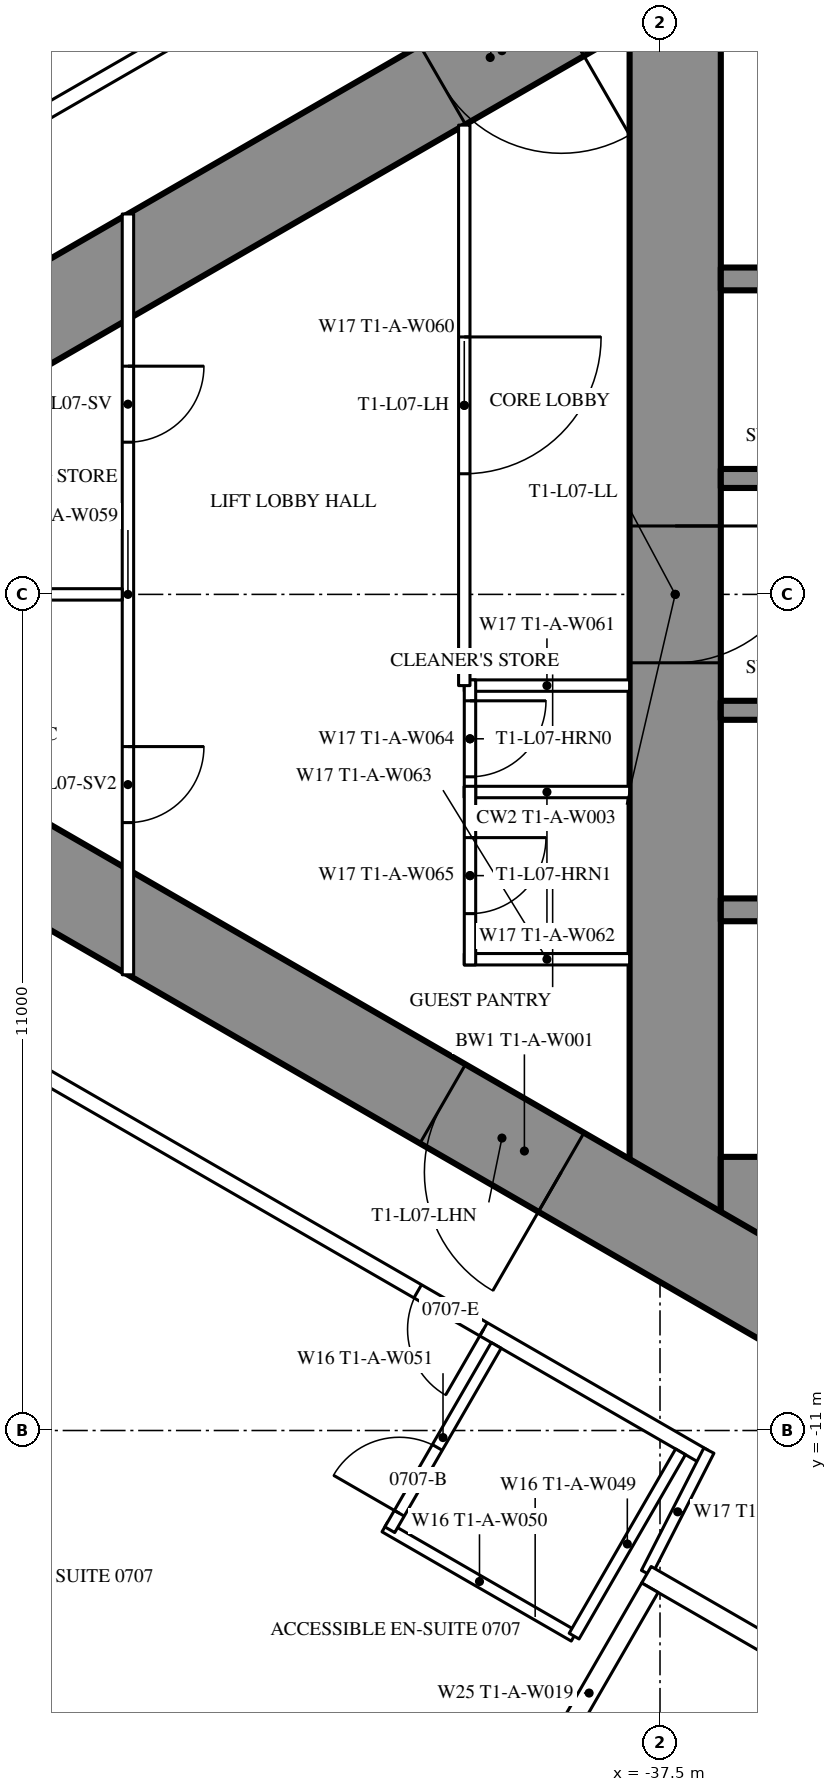
"""IFC4 building model, lengths in metres.
Left out: names, types, materials, properties, quantities, classifications, styles, units other than length and angle.
Written with IfcOpenShell. Run it as: python <this file> out.ifc"""

import sys

from ifc_helpers import new_model, si_unit, direction, frame, frame_2d, origin, place, context, subcontext, project, spatial, rectangle, extrude, element, fill, save


model = new_model("IFC4")
c1 = context("Model", 3, precision=1e-05, world=origin(), true_north=direction((0.0, 1.0)))
c2 = subcontext(c1, "Body", "Model", "MODEL_VIEW")
j1 = project(units=[si_unit("LENGTHUNIT", "METRE"), si_unit("PLANEANGLEUNIT", "RADIAN")], contexts=[c1])
p1 = place(None, origin())
s1 = spatial("IfcSite", under=j1, at=p1, CompositionType="ELEMENT")
p2 = place(p1, origin())
s2 = spatial("IfcBuilding", under=s1, at=p2, CompositionType="ELEMENT")
p3 = place(p2, frame((0.0, 0.0, 32.0)))
s3 = spatial("IfcBuildingStorey", under=s2, at=p3, CompositionType="ELEMENT", Elevation=32.0)
p4 = place(p3, frame((-37.3, 8.6, 0.0), z_axis=(0.0, 0.0, 1.0), x_axis=(0.0, -1.0, 0.0)))
e1 = element("IfcWall", 1, at=p4, inside=s3, PredefinedType="SHEAR", context=c2, shape_type="SweptSolid", body=[
    extrude(rectangle(XDim=17.2, YDim=1.2, at=frame_2d((8.6, 0.0))), origin(), (0.0, 0.0, 1.0), 3.5),
])
p5 = place(p4, frame((7.7, 0.0, 0.0)))
e2 = element("IfcOpeningElement", 2, at=p5, cuts=e1, PredefinedType="OPENING", context=c2, shape_type="SweptSolid", body=[
    extrude(rectangle(XDim=1.8, YDim=2.2, at=frame_2d((0.9, 1.1))), frame((0.0, 0.61, 0.0), z_axis=(0.0, -1.0, 0.0), x_axis=(1.0, 0.0, 0.0)), (0.0, 0.0, 1.0), 1.22),
])
p6 = place(p3, frame((-28.3, -8.0, 0.0), z_axis=(0.0, 0.0, 1.0), x_axis=(-1.0, 0.0, 0.0)))
e3 = element("IfcWall", 3, at=p6, inside=s3, PredefinedType="SHEAR", context=c2, shape_type="SweptSolid", body=[
    extrude(rectangle(XDim=8.4, YDim=1.2, at=frame_2d((4.2, 0.0))), origin(), (0.0, 0.0, 1.0), 3.5),
])
p7 = place(p6, frame((0.25, 0.0, 0.0)))
e4 = element("IfcOpeningElement", 4, at=p7, cuts=e3, PredefinedType="OPENING", context=c2, shape_type="SweptSolid", body=[
    extrude(rectangle(XDim=1.0, YDim=2.2, at=frame_2d((0.5, 1.1))), frame((0.0, 0.61, 0.0), z_axis=(0.0, -1.0, 0.0), x_axis=(1.0, 0.0, 0.0)), (0.0, 0.0, 1.0), 1.22),
])
for number, where, z_axis, x_axis in (
    (5, (-28.3, 4.15, 0.0), (0.0, 0.0, 1.0), (-1.0, 0.0, 0.0)),
    (6, (-28.3, -4.15, 0.0), (0.0, 0.0, 1.0), (-1.0, 0.0, 0.0)),
):
    element("IfcWall", number, at=place(p3, frame(where, z_axis=z_axis, x_axis=x_axis)), inside=s3, PredefinedType="SHEAR", context=c2, shape_type="SweptSolid", body=[
        extrude(rectangle(XDim=8.4, YDim=0.3, at=frame_2d((4.2, 0.0))), origin(), (0.0, 0.0, 1.0), 3.5),
    ])
for number, where, z_axis, x_axis in (
    (7, (-34.25, 1.525, 0.0), (0.0, 0.0, 1.0), (-1.0, 0.0, 0.0)),
    (8, (-34.25, -1.525, 0.0), (0.0, 0.0, 1.0), (-1.0, 0.0, 0.0)),
):
    element("IfcWall", number, at=place(p3, frame(where, z_axis=z_axis, x_axis=x_axis)), inside=s3, PredefinedType="SHEAR", context=c2, shape_type="SweptSolid", body=[
        extrude(rectangle(XDim=2.45, YDim=0.25, at=frame_2d((1.225, 0.0))), origin(), (0.0, 0.0, 1.0), 3.5),
    ])
p8 = place(p3, frame((-27.2, 14.3, 0.0), z_axis=(0.0, 0.0, 1.0), x_axis=(-0.866026593062, -0.499997940104, 0.0)))
e9 = element("IfcWall", 9, at=p8, inside=s3, PredefinedType="SHEAR", context=c2, shape_type="SweptSolid", body=[
    extrude(rectangle(XDim=28.946, YDim=1.2, at=frame_2d((14.473, 0.0))), origin(), (0.0, 0.0, 1.0), 3.5),
])
p9 = place(p8, frame((4.6, 0.0, 0.0)))
e10 = element("IfcOpeningElement", 10, at=p9, cuts=e9, PredefinedType="OPENING", context=c2, shape_type="SweptSolid", body=[
    extrude(rectangle(XDim=1.0, YDim=2.2, at=frame_2d((0.5, 1.1))), frame((0.0, 0.61, 0.0), z_axis=(0.0, -1.0, 0.0), x_axis=(1.0, 0.0, 0.0)), (0.0, 0.0, 1.0), 1.22),
])
p10 = place(p8, frame((13.395, 0.0, 0.0)))
e11 = element("IfcOpeningElement", 11, at=p10, cuts=e9, PredefinedType="OPENING", context=c2, shape_type="SweptSolid", body=[
    extrude(rectangle(XDim=1.8, YDim=2.2, at=frame_2d((0.9, 1.1))), frame((0.0, 0.61, 0.0), z_axis=(0.0, -1.0, 0.0), x_axis=(1.0, 0.0, 0.0)), (0.0, 0.0, 1.0), 1.22),
])
p11 = place(p3, frame((-27.2, -14.3, 0.0), z_axis=(0.0, 0.0, 1.0), x_axis=(-0.866024021859, 0.500002393557, 0.0)))
e12 = element("IfcWall", 12, at=p11, inside=s3, PredefinedType="SHEAR", context=c2, shape_type="SweptSolid", body=[
    extrude(rectangle(XDim=27.907, YDim=1.2, at=frame_2d((13.954, 0.0))), origin(), (0.0, 0.0, 1.0), 3.5),
])
p12 = place(p11, frame((4.6, 0.0, 0.0)))
e13 = element("IfcOpeningElement", 13, at=p12, cuts=e12, PredefinedType="OPENING", context=c2, shape_type="SweptSolid", body=[
    extrude(rectangle(XDim=1.0, YDim=2.2, at=frame_2d((0.5, 1.1))), frame((0.0, 0.61, 0.0), z_axis=(0.0, -1.0, 0.0), x_axis=(1.0, 0.0, 0.0)), (0.0, 0.0, 1.0), 1.22),
])
p13 = place(p11, frame((13.395, 0.0, 0.0)))
e14 = element("IfcOpeningElement", 14, at=p13, cuts=e12, PredefinedType="OPENING", context=c2, shape_type="SweptSolid", body=[
    extrude(rectangle(XDim=1.8, YDim=2.2, at=frame_2d((0.9, 1.1))), frame((0.0, 0.61, 0.0), z_axis=(0.0, -1.0, 0.0), x_axis=(1.0, 0.0, 0.0)), (0.0, 0.0, 1.0), 1.22),
])
p14 = place(p3, frame((-37.7, 10.894, 0.0), z_axis=(0.0, 0.0, 1.0), x_axis=(-0.866027905338, -0.499995667157, 0.0)))
e15 = element("IfcWall", 15, at=p14, inside=s3, PredefinedType="PARTITIONING", context=c2, shape_type="SweptSolid", body=[
    extrude(rectangle(XDim=21.787, YDim=0.2, at=frame_2d((10.894, 0.0))), origin(), (0.0, 0.0, 1.0), 3.25),
])
p15 = place(p14, frame((16.008, 0.0, 0.0)))
e16 = element("IfcOpeningElement", 16, at=p15, cuts=e15, PredefinedType="OPENING", context=c2, shape_type="SweptSolid", body=[
    extrude(rectangle(XDim=0.95, YDim=2.2, at=frame_2d((0.475, 1.1))), frame((0.0, 0.11, 0.0), z_axis=(0.0, -1.0, 0.0), x_axis=(1.0, 0.0, 0.0)), (0.0, 0.0, 1.0), 0.22),
])
p16 = place(p14, frame((20.058, 0.0, 0.0)))
e17 = element("IfcOpeningElement", 17, at=p16, cuts=e15, PredefinedType="OPENING", context=c2, shape_type="SweptSolid", body=[
    extrude(rectangle(XDim=0.95, YDim=2.2, at=frame_2d((0.475, 1.1))), frame((0.0, 0.11, 0.0), z_axis=(0.0, -1.0, 0.0), x_axis=(1.0, 0.0, 0.0)), (0.0, 0.0, 1.0), 0.22),
])
p17 = place(p14, frame((2.95, 0.0, 0.0)))
e18 = element("IfcOpeningElement", 18, at=p17, cuts=e15, PredefinedType="OPENING", context=c2, shape_type="SweptSolid", body=[
    extrude(rectangle(XDim=0.95, YDim=2.2, at=frame_2d((0.475, 1.1))), frame((0.0, 0.11, 0.0), z_axis=(0.0, -1.0, 0.0), x_axis=(1.0, 0.0, 0.0)), (0.0, 0.0, 1.0), 0.22),
])
p18 = place(p3, frame((-36.92, -11.344, 0.0), z_axis=(0.0, 0.0, 1.0), x_axis=(-0.866028313256, 0.499994960614, 0.0)))
e19 = element("IfcWall", 19, at=p18, inside=s3, PredefinedType="PARTITIONING", context=c2, shape_type="SweptSolid", body=[
    extrude(rectangle(XDim=22.568, YDim=0.2, at=frame_2d((11.284, 0.0))), origin(), (0.0, 0.0, 1.0), 3.25),
])
p19 = place(p18, frame((12.68, 0.0, 0.0)))
e20 = element("IfcOpeningElement", 20, at=p19, cuts=e19, PredefinedType="OPENING", context=c2, shape_type="SweptSolid", body=[
    extrude(rectangle(XDim=0.95, YDim=2.2, at=frame_2d((0.475, 1.1))), frame((0.0, 0.11, 0.0), z_axis=(0.0, -1.0, 0.0), x_axis=(1.0, 0.0, 0.0)), (0.0, 0.0, 1.0), 0.22),
])
p20 = place(p18, frame((3.35, 0.0, 0.0)))
e21 = element("IfcOpeningElement", 21, at=p20, cuts=e19, PredefinedType="OPENING", context=c2, shape_type="SweptSolid", body=[
    extrude(rectangle(XDim=1.0, YDim=2.2, at=frame_2d((0.5, 1.1))), frame((0.0, 0.11, 0.0), z_axis=(0.0, -1.0, 0.0), x_axis=(1.0, 0.0, 0.0)), (0.0, 0.0, 1.0), 0.22),
])
p21 = place(p3, frame((-36.857, -11.265, 0.0), z_axis=(0.0, 0.0, 1.0), x_axis=(-0.454225294761, -0.890886851176, 0.0)))
e22 = element("IfcWall", 22, at=p21, inside=s3, PredefinedType="PARTITIONING", context=c2, shape_type="SweptSolid", body=[
    extrude(rectangle(XDim=1.807, YDim=0.15, at=frame_2d((0.904, 0.0))), origin(), (0.0, 0.0, 1.0), 3.25),
])
p22 = place(p3, frame((-38.63, -13.705, 0.0), z_axis=(0.0, 0.0, 1.0), x_axis=(-0.866018712932, 0.500011588718, 0.0)))
e23 = element("IfcWall", 23, at=p22, inside=s3, PredefinedType="PARTITIONING", context=c2, shape_type="SweptSolid", body=[
    extrude(rectangle(XDim=2.875, YDim=0.15, at=frame_2d((1.438, 0.0))), origin(), (0.0, 0.0, 1.0), 3.25),
])
p23 = place(p3, frame((-39.655, -9.88, 0.0), z_axis=(0.0, 0.0, 1.0), x_axis=(-0.500049511043, -0.865996816683, 0.0)))
e24 = element("IfcWall", 24, at=p23, inside=s3, PredefinedType="PARTITIONING", context=c2, shape_type="SweptSolid", body=[
    extrude(rectangle(XDim=2.8, YDim=0.15, at=frame_2d((1.4, 0.0))), origin(), (0.0, 0.0, 1.0), 3.25),
])
p24 = place(p23, frame((1.55, 0.0, 0.0)))
e25 = element("IfcOpeningElement", 25, at=p24, cuts=e24, PredefinedType="OPENING", context=c2, shape_type="SweptSolid", body=[
    extrude(rectangle(XDim=1.0, YDim=2.2, at=frame_2d((0.5, 1.1))), frame((0.0, 0.085, 0.0), z_axis=(0.0, -1.0, 0.0), x_axis=(1.0, 0.0, 0.0)), (0.0, 0.0, 1.0), 0.17),
])
p25 = place(p3, frame((-37.23, -11.281, 0.0), z_axis=(0.0, 0.0, 1.0), x_axis=(-0.500049511043, -0.865996816683, 0.0)))
e26 = element("IfcWall", 26, at=p25, inside=s3, PredefinedType="PARTITIONING", context=c2, shape_type="SweptSolid", body=[
    extrude(rectangle(XDim=2.8, YDim=0.15, at=frame_2d((1.4, 0.0))), origin(), (0.0, 0.0, 1.0), 3.25),
])
for number, where, z_axis, x_axis in (
    (27, (-37.9, -1.2, 0.0), (0.0, 0.0, 1.0), (-1.0, 0.0, 0.0)),
    (28, (-37.9, -2.6, 0.0), (0.0, 0.0, 1.0), (-1.0, 0.0, 0.0)),
    (29, (-37.9, -4.8, 0.0), (0.0, 0.0, 1.0), (-1.0, 0.0, 0.0)),
):
    element("IfcWall", number, at=place(p3, frame(where, z_axis=z_axis, x_axis=x_axis)), inside=s3, PredefinedType="PARTITIONING", context=c2, shape_type="SweptSolid", body=[
        extrude(rectangle(XDim=2.175, YDim=0.15, at=frame_2d((1.087, 0.0))), origin(), (0.0, 0.0, 1.0), 3.25),
    ])
p26 = place(p3, frame((-40.0, -1.125, 0.0), z_axis=(0.0, 0.0, 1.0), x_axis=(0.0, -1.0, 0.0)))
e30 = element("IfcWall", 30, at=p26, inside=s3, PredefinedType="PARTITIONING", context=c2, shape_type="SweptSolid", body=[
    extrude(rectangle(XDim=1.55, YDim=0.15, at=frame_2d((0.775, 0.0))), origin(), (0.0, 0.0, 1.0), 3.25),
])
p27 = place(p26, frame((0.275, 0.0, 0.0)))
e31 = element("IfcOpeningElement", 31, at=p27, cuts=e30, PredefinedType="OPENING", context=c2, shape_type="SweptSolid", body=[
    extrude(rectangle(XDim=1.0, YDim=2.2, at=frame_2d((0.5, 1.1))), frame((0.0, 0.085, 0.0), z_axis=(0.0, -1.0, 0.0), x_axis=(1.0, 0.0, 0.0)), (0.0, 0.0, 1.0), 0.17),
])
p28 = place(p3, frame((-40.0, -2.525, 0.0), z_axis=(0.0, 0.0, 1.0), x_axis=(0.0, -1.0, 0.0)))
e32 = element("IfcWall", 32, at=p28, inside=s3, PredefinedType="PARTITIONING", context=c2, shape_type="SweptSolid", body=[
    extrude(rectangle(XDim=2.35, YDim=0.15, at=frame_2d((1.175, 0.0))), origin(), (0.0, 0.0, 1.0), 3.25),
])
p29 = place(p28, frame((0.675, 0.0, 0.0)))
e33 = element("IfcOpeningElement", 33, at=p29, cuts=e32, PredefinedType="OPENING", context=c2, shape_type="SweptSolid", body=[
    extrude(rectangle(XDim=1.0, YDim=2.2, at=frame_2d((0.5, 1.1))), frame((0.0, 0.085, 0.0), z_axis=(0.0, -1.0, 0.0), x_axis=(1.0, 0.0, 0.0)), (0.0, 0.0, 1.0), 0.17),
])
p30 = place(p3, frame((-40.075, 6.174, 0.0), z_axis=(0.0, 0.0, 1.0), x_axis=(0.0, -1.0, 0.0)))
e34 = element("IfcWall", 34, at=p30, inside=s3, PredefinedType="PARTITIONING", context=c2, shape_type="SweptSolid", body=[
    extrude(rectangle(XDim=7.374, YDim=0.15, at=frame_2d((3.687, 0.0))), origin(), (0.0, 0.0, 1.0), 3.25),
])
p31 = place(p30, frame((2.787, 0.0, 0.0)))
e35 = element("IfcOpeningElement", 35, at=p31, cuts=e34, PredefinedType="OPENING", context=c2, shape_type="SweptSolid", body=[
    extrude(rectangle(XDim=1.8, YDim=2.2, at=frame_2d((0.9, 1.1))), frame((0.0, 0.085, 0.0), z_axis=(0.0, -1.0, 0.0), x_axis=(1.0, 0.0, 0.0)), (0.0, 0.0, 1.0), 0.17),
])
p32 = place(p3, frame((-44.5, 5.005, 0.0), z_axis=(0.0, 0.0, 1.0), x_axis=(0.0, -1.0, 0.0)))
e36 = element("IfcWall", 36, at=p32, inside=s3, PredefinedType="PARTITIONING", context=c2, shape_type="SweptSolid", body=[
    extrude(rectangle(XDim=10.009, YDim=0.15, at=frame_2d((5.005, 0.0))), origin(), (0.0, 0.0, 1.0), 2.45),
])
p33 = place(p32, frame((2.002, 0.0, 0.0)))
e37 = element("IfcOpeningElement", 37, at=p33, cuts=e36, PredefinedType="OPENING", context=c2, shape_type="SweptSolid", body=[
    extrude(rectangle(XDim=1.0, YDim=2.2, at=frame_2d((0.5, 1.1))), frame((0.0, 0.085, 0.0), z_axis=(0.0, -1.0, 0.0), x_axis=(1.0, 0.0, 0.0)), (0.0, 0.0, 1.0), 0.17),
])
p34 = place(p32, frame((7.007, 0.0, 0.0)))
e38 = element("IfcOpeningElement", 38, at=p34, cuts=e36, PredefinedType="OPENING", context=c2, shape_type="SweptSolid", body=[
    extrude(rectangle(XDim=1.0, YDim=2.2, at=frame_2d((0.5, 1.1))), frame((0.0, 0.085, 0.0), z_axis=(0.0, -1.0, 0.0), x_axis=(1.0, 0.0, 0.0)), (0.0, 0.0, 1.0), 0.17),
])
p35 = place(p3, frame((-44.575, 0.0, 0.0), z_axis=(0.0, 0.0, 1.0), x_axis=(-1.0, 0.0, 0.0)))
e39 = element("IfcWall", 39, at=p35, inside=s3, PredefinedType="PARTITIONING", context=c2, shape_type="SweptSolid", body=[
    extrude(rectangle(XDim=8.593, YDim=0.15, at=frame_2d((4.297, 0.0))), origin(), (0.0, 0.0, 1.0), 2.25),
])
p36 = place(p3, frame((-33.696, -15.197, 0.0), z_axis=(0.0, 0.0, 1.0), x_axis=(-0.865976953817, 0.500083908417, 0.0)))
e40 = element("IfcWall", 40, at=p36, inside=s3, PredefinedType="PARTITIONING", context=c2, shape_type="SweptSolid", body=[
    extrude(rectangle(XDim=4.599, YDim=0.25, at=frame_2d((2.3, 0.0))), origin(), (0.0, 0.0, 1.0), 3.25),
])
p37 = place(p3, frame((-37.633, -13.068, 0.0), z_axis=(0.0, 0.0, 1.0), x_axis=(-0.499872130319, -0.866099216793, 0.0)))
e41 = element("IfcWall", 41, at=p37, inside=s3, PredefinedType="PARTITIONING", context=c2, shape_type="SweptSolid", body=[
    extrude(rectangle(XDim=3.2, YDim=0.25, at=frame_2d((1.6, 0.0))), origin(), (0.0, 0.0, 1.0), 3.25),
])
p38 = place(p24, origin())
e42 = element("IfcDoor", 42, at=p38, inside=s3, OperationType="SINGLE_SWING_RIGHT", PredefinedType="DOOR", context=c2, shape_type="SweptSolid", body=[
    extrude(rectangle(XDim=1.0, YDim=2.2, at=frame_2d((0.5, 1.1))), frame((0.0, 0.025, 0.0), z_axis=(0.0, -1.0, 0.0), x_axis=(1.0, 0.0, 0.0)), (0.0, 0.0, 1.0), 0.05),
])
fill(e25, e42)
p39 = place(p20, origin())
e43 = element("IfcDoor", 43, at=p39, inside=s3, OperationType="SINGLE_SWING_LEFT", PredefinedType="DOOR", context=c2, shape_type="SweptSolid", body=[
    extrude(rectangle(XDim=1.0, YDim=2.2, at=frame_2d((0.5, 1.1))), frame((0.0, 0.025, 0.0), z_axis=(0.0, -1.0, 0.0), x_axis=(1.0, 0.0, 0.0)), (0.0, 0.0, 1.0), 0.05),
])
fill(e21, e43)
p40 = place(p27, origin())
e44 = element("IfcDoor", 44, at=p40, inside=s3, OperationType="SINGLE_SWING_LEFT", PredefinedType="DOOR", context=c2, shape_type="SweptSolid", body=[
    extrude(rectangle(XDim=1.0, YDim=2.2, at=frame_2d((0.5, 1.1))), frame((0.0, 0.025, 0.0), z_axis=(0.0, -1.0, 0.0), x_axis=(1.0, 0.0, 0.0)), (0.0, 0.0, 1.0), 0.05),
])
fill(e31, e44)
p41 = place(p29, origin())
e45 = element("IfcDoor", 45, at=p41, inside=s3, OperationType="SINGLE_SWING_LEFT", PredefinedType="DOOR", context=c2, shape_type="SweptSolid", body=[
    extrude(rectangle(XDim=1.0, YDim=2.2, at=frame_2d((0.5, 1.1))), frame((0.0, 0.025, 0.0), z_axis=(0.0, -1.0, 0.0), x_axis=(1.0, 0.0, 0.0)), (0.0, 0.0, 1.0), 0.05),
])
fill(e33, e45)
p42 = place(p31, origin())
e46 = element("IfcDoor", 46, at=p42, inside=s3, OperationType="DOUBLE_DOOR_SINGLE_SWING", PredefinedType="DOOR", context=c2, shape_type="SweptSolid", body=[
    extrude(rectangle(XDim=1.8, YDim=2.2, at=frame_2d((0.9, 1.1))), frame((0.0, 0.025, 0.0), z_axis=(0.0, -1.0, 0.0), x_axis=(1.0, 0.0, 0.0)), (0.0, 0.0, 1.0), 0.05),
])
fill(e35, e46)
p43 = place(p33, origin())
e47 = element("IfcDoor", 47, at=p43, inside=s3, OperationType="SINGLE_SWING_LEFT", PredefinedType="DOOR", context=c2, shape_type="SweptSolid", body=[
    extrude(rectangle(XDim=1.0, YDim=2.2, at=frame_2d((0.5, 1.1))), frame((0.0, 0.025, 0.0), z_axis=(0.0, -1.0, 0.0), x_axis=(1.0, 0.0, 0.0)), (0.0, 0.0, 1.0), 0.05),
])
fill(e37, e47)
p44 = place(p34, origin())
e48 = element("IfcDoor", 48, at=p44, inside=s3, OperationType="SINGLE_SWING_LEFT", PredefinedType="DOOR", context=c2, shape_type="SweptSolid", body=[
    extrude(rectangle(XDim=1.0, YDim=2.2, at=frame_2d((0.5, 1.1))), frame((0.0, 0.025, 0.0), z_axis=(0.0, -1.0, 0.0), x_axis=(1.0, 0.0, 0.0)), (0.0, 0.0, 1.0), 0.05),
])
fill(e38, e48)
p45 = place(p10, origin())
e49 = element("IfcDoor", 49, at=p45, inside=s3, OperationType="DOUBLE_DOOR_SINGLE_SWING", PredefinedType="DOOR", context=c2, shape_type="SweptSolid", body=[
    extrude(rectangle(XDim=1.8, YDim=2.2, at=frame_2d((0.9, 1.1))), frame((0.0, 0.025, 0.0), z_axis=(0.0, -1.0, 0.0), x_axis=(1.0, 0.0, 0.0)), (0.0, 0.0, 1.0), 0.05),
])
fill(e11, e49)
p46 = place(p13, origin())
e50 = element("IfcDoor", 50, at=p46, inside=s3, OperationType="DOUBLE_DOOR_SINGLE_SWING", PredefinedType="DOOR", context=c2, shape_type="SweptSolid", body=[
    extrude(rectangle(XDim=1.8, YDim=2.2, at=frame_2d((0.9, 1.1))), frame((0.0, 0.025, 0.0), z_axis=(0.0, -1.0, 0.0), x_axis=(1.0, 0.0, 0.0)), (0.0, 0.0, 1.0), 0.05),
])
fill(e14, e50)
p47 = place(p5, origin())
e51 = element("IfcDoor", 51, at=p47, inside=s3, OperationType="DOUBLE_DOOR_SINGLE_SWING", PredefinedType="DOOR", context=c2, shape_type="SweptSolid", body=[
    extrude(rectangle(XDim=1.8, YDim=2.2, at=frame_2d((0.9, 1.1))), frame((0.0, 0.025, 0.0), z_axis=(0.0, -1.0, 0.0), x_axis=(1.0, 0.0, 0.0)), (0.0, 0.0, 1.0), 0.05),
])
fill(e2, e51)
save(model, sys.argv[1])
